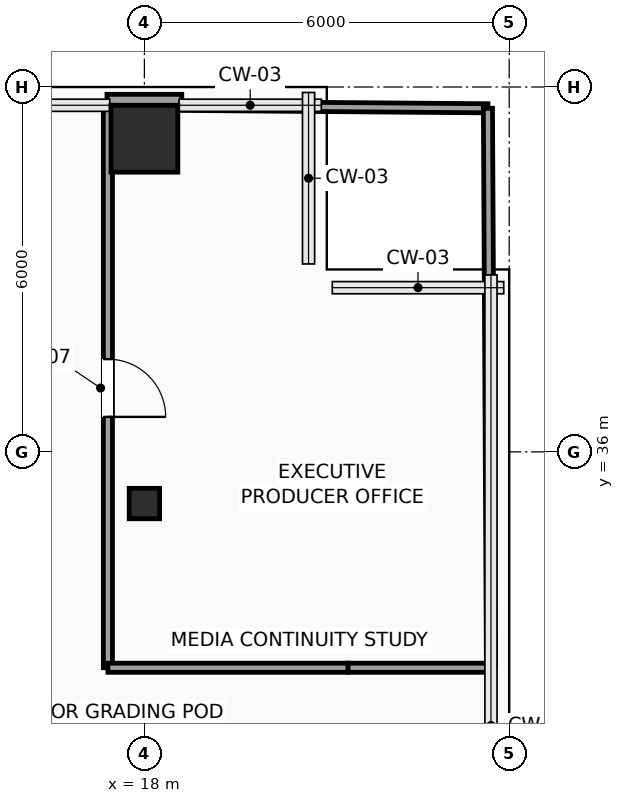
"""IFC4 building model, lengths in metres.
Left out: names, types, materials, properties, quantities, classifications, styles, units other than length and angle.
Written with IfcOpenShell. Run it as: python <this file> out.ifc"""

import sys

from ifc_helpers import new_model, si_unit, direction, frame, frame_2d, origin, origin_2d, place, context, subcontext, project, spatial, rectangle, hollow_rectangle, extrude, element, fill, save


model = new_model("IFC4")
c1 = context("Model", 3, precision=1e-05, world=origin(), true_north=direction((0.0, 1.0)))
c2 = subcontext(c1, "Body", "Model", "MODEL_VIEW")
j1 = project(units=[si_unit("LENGTHUNIT", "METRE"), si_unit("PLANEANGLEUNIT", "RADIAN")], contexts=[c1])
p1 = place(None, origin())
s1 = spatial("IfcSite", under=j1, at=p1, CompositionType="ELEMENT")
p2 = place(p1, origin())
s2 = spatial("IfcBuilding", under=s1, at=p2, CompositionType="ELEMENT")
p3 = place(p2, frame((0.0, 0.0, 160.65)))
s3 = spatial("IfcBuildingStorey", under=s2, at=p3, CompositionType="ELEMENT", Elevation=160.65)
p4 = place(p3, frame((18.0, 35.15, 0.0), z_axis=(0.0, 0.0, 1.0), x_axis=(1.0, 0.0, 0.0)))
e1 = element("IfcColumn", 1, at=p4, inside=s3, PredefinedType="COLUMN", context=c2, shape_type="SweptSolid", body=[
    extrude(hollow_rectangle(XDim=0.5, YDim=0.5, WallThickness=0.025, InnerFilletRadius=0.025, OuterFilletRadius=0.04, at=origin_2d()), origin(), (0.0, 0.0, 1.0), 3.75),
])
p5 = place(p3, frame((18.0, 41.15, 0.0), z_axis=(0.0, 0.0, 1.0), x_axis=(1.0, 0.0, 0.0)))
e2 = element("IfcColumn", 2, at=p5, inside=s3, PredefinedType="COLUMN", context=c2, shape_type="SweptSolid", body=[
    extrude(rectangle(XDim=1.1, YDim=1.1, at=origin_2d()), origin(), (0.0, 0.0, 1.0), 3.75),
])
p6 = place(p3, frame((17.385, 41.76, 0.0), z_axis=(0.0, 0.0, 1.0), x_axis=(1.0, 0.0, 0.0)))
e3 = element("IfcWall", 3, at=p6, inside=s3, PredefinedType="SOLIDWALL", context=c2, shape_type="SweptSolid", body=[
    extrude(rectangle(XDim=1.23, YDim=0.24, at=frame_2d((0.615, 0.0))), origin(), (0.0, 0.0, 1.0), 3.425),
])
p7 = place(p3, frame((17.4, 41.7, 0.0), z_axis=(0.0, 0.0, 1.0), x_axis=(0.0, -1.0, 0.0)))
e4 = element("IfcWall", 4, at=p7, inside=s3, PredefinedType="PARTITIONING", context=c2, shape_type="SweptSolid", body=[
    extrude(rectangle(XDim=9.25, YDim=0.15, at=frame_2d((4.625, 0.0))), origin(), (0.0, 0.0, 1.0), 3.425),
])
p8 = place(p7, frame((4.175, 0.0, 0.0)))
e5 = element("IfcOpeningElement", 5, at=p8, cuts=e4, PredefinedType="OPENING", context=c2, shape_type="SweptSolid", body=[
    extrude(rectangle(XDim=0.95, YDim=2.15, at=frame_2d((0.475, 1.075))), frame((0.0, 0.085, 0.0), z_axis=(0.0, -1.0, 0.0), x_axis=(1.0, 0.0, 0.0)), (0.0, 0.0, 1.0), 0.17),
])
p9 = place(p3, frame((17.4, 32.45, 0.0), z_axis=(0.0, 0.0, 1.0), x_axis=(1.0, 0.0, 0.0)))
e6 = element("IfcWall", 6, at=p9, inside=s3, PredefinedType="PARTITIONING", context=c2, shape_type="SweptSolid", body=[
    extrude(rectangle(XDim=3.95, YDim=0.15, at=frame_2d((1.975, 0.0))), origin(), (0.0, 0.0, 1.0), 3.425),
])
p10 = place(p3, frame((21.35, 32.45, 0.0), z_axis=(0.0, 0.0, 1.0), x_axis=(1.0, 0.0, 0.0)))
e7 = element("IfcWall", 7, at=p10, inside=s3, PredefinedType="PARTITIONING", context=c2, shape_type="SweptSolid", body=[
    extrude(rectangle(XDim=2.35, YDim=0.15, at=frame_2d((1.175, 0.0))), origin(), (0.0, 0.0, 1.0), 3.425),
])
p11 = place(p3, frame((18.615, 41.69, 0.0), z_axis=(0.0, 0.0, 1.0), x_axis=(0.99996799533, -0.008000519771, 0.0)))
e8 = element("IfcWall", 8, at=p11, inside=s3, PredefinedType="PARTITIONING", context=c2, shape_type="SweptSolid", body=[
    extrude(rectangle(XDim=5.035, YDim=0.15, at=frame_2d((2.518, 0.0))), origin(), (0.0, 0.0, 1.0), 3.425),
])
p12 = place(p3, frame((23.7, 32.45, 0.0), z_axis=(0.0, 0.0, 1.0), x_axis=(-0.005440038388, 0.999985202882, 0.0)))
e9 = element("IfcWall", 9, at=p12, inside=s3, PredefinedType="PARTITIONING", context=c2, shape_type="SweptSolid", body=[
    extrude(rectangle(XDim=9.2, YDim=0.15, at=frame_2d((4.6, 0.0))), origin(), (0.0, 0.0, 1.0), 3.425),
])
p13 = place(p8, origin())
e10 = element("IfcDoor", 10, at=p13, inside=s3, OperationType="SINGLE_SWING_RIGHT", PredefinedType="DOOR", context=c2, shape_type="SweptSolid", body=[
    extrude(rectangle(XDim=0.95, YDim=2.15, at=frame_2d((0.475, 1.075))), frame((0.0, 0.025, 0.0), z_axis=(0.0, -1.0, 0.0), x_axis=(1.0, 0.0, 0.0)), (0.0, 0.0, 1.0), 0.05),
])
fill(e5, e10)
save(model, sys.argv[1])
